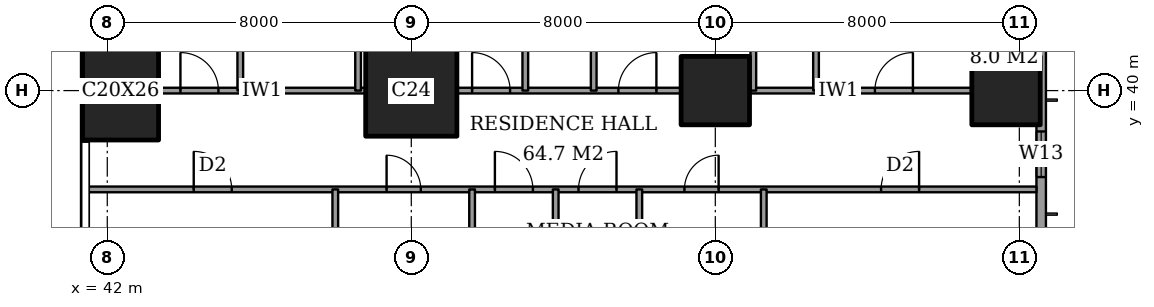
"""IFC4 building model, lengths in metres.
Left out: names, types, materials, properties, quantities, classifications, styles, units other than length and angle.
Written with IfcOpenShell. Run it as: python <this file> out.ifc"""

import sys

from ifc_helpers import new_model, si_unit, direction, frame, frame_2d, origin, origin_2d, place, context, subcontext, project, spatial, rectangle, extrude, element, fill, save


model = new_model("IFC4")
c1 = context("Model", 3, precision=1e-05, world=origin(), true_north=direction((0.0, 1.0)))
c2 = subcontext(c1, "Body", "Model", "MODEL_VIEW")
j1 = project(units=[si_unit("LENGTHUNIT", "METRE"), si_unit("PLANEANGLEUNIT", "RADIAN")], contexts=[c1])
p1 = place(None, origin())
s1 = spatial("IfcSite", under=j1, at=p1, CompositionType="ELEMENT")
p2 = place(p1, origin())
s2 = spatial("IfcBuilding", under=s1, at=p2, CompositionType="ELEMENT")
p3 = place(p2, frame((0.0, 0.0, 218.2)))
s3 = spatial("IfcBuildingStorey", under=s2, at=p3, CompositionType="ELEMENT", Elevation=218.2)
p4 = place(p3, frame((42.35, 40.0, 0.0), z_axis=(0.0, 0.0, 1.0), x_axis=(1.0, 0.0, 0.0)))
e1 = element("IfcColumn", 1, at=p4, inside=s3, PredefinedType="COLUMN", context=c2, shape_type="SweptSolid", body=[
    extrude(rectangle(XDim=2.0, YDim=2.6, at=origin_2d()), origin(), (0.0, 0.0, 1.0), 3.6),
])
p5 = place(p3, frame((50.0, 40.0, 0.0), z_axis=(0.0, 0.0, 1.0), x_axis=(1.0, 0.0, 0.0)))
e2 = element("IfcColumn", 2, at=p5, inside=s3, PredefinedType="COLUMN", context=c2, shape_type="SweptSolid", body=[
    extrude(rectangle(XDim=2.4, YDim=2.4, at=origin_2d()), origin(), (0.0, 0.0, 1.0), 3.6),
])
for number, where, z_axis, x_axis in (
    (3, (58.0, 40.0, 0.0), (0.0, 0.0, 1.0), (1.0, 0.0, 0.0)),
    (4, (65.65, 40.0, 0.0), (0.0, 0.0, 1.0), (1.0, 0.0, 0.0)),
):
    element("IfcColumn", number, at=place(p3, frame(where, z_axis=z_axis, x_axis=x_axis)), inside=s3, PredefinedType="COLUMN", context=c2, shape_type="SweptSolid", body=[
        extrude(rectangle(XDim=1.8, YDim=1.8, at=origin_2d()), origin(), (0.0, 0.0, 1.0), 3.6),
    ])
p6 = place(p3, frame((66.575, 3.175, 0.0), z_axis=(0.0, 0.0, 1.0), x_axis=(0.0, 1.0, 0.0)))
e5 = element("IfcWall", 5, at=p6, inside=s3, PredefinedType="SOLIDWALL", context=c2, shape_type="SweptSolid", body=[
    extrude(rectangle(XDim=41.65, YDim=0.25, at=frame_2d((20.825, 0.0))), origin(), (0.0, 0.0, 1.0), 3.6),
])
p7 = place(p6, frame((0.825, 0.0, 0.2)))
e6 = element("IfcOpeningElement", 6, at=p7, cuts=e5, PredefinedType="OPENING", context=c2, shape_type="SweptSolid", body=[
    extrude(rectangle(XDim=2.4, YDim=2.4, at=frame_2d((1.2, 1.2))), frame((0.0, 0.135, 0.0), z_axis=(0.0, -1.0, 0.0), x_axis=(1.0, 0.0, 0.0)), (0.0, 0.0, 1.0), 0.27),
])
p8 = place(p6, frame((6.225, 0.0, 0.2)))
e7 = element("IfcOpeningElement", 7, at=p8, cuts=e5, PredefinedType="OPENING", context=c2, shape_type="SweptSolid", body=[
    extrude(rectangle(XDim=1.2, YDim=2.4, at=frame_2d((0.6, 1.2))), frame((0.0, 0.135, 0.0), z_axis=(0.0, -1.0, 0.0), x_axis=(1.0, 0.0, 0.0)), (0.0, 0.0, 1.0), 0.27),
])
p9 = place(p6, frame((8.675, 0.0, 0.2)))
e8 = element("IfcOpeningElement", 8, at=p9, cuts=e5, PredefinedType="OPENING", context=c2, shape_type="SweptSolid", body=[
    extrude(rectangle(XDim=2.4, YDim=2.4, at=frame_2d((1.2, 1.2))), frame((0.0, 0.135, 0.0), z_axis=(0.0, -1.0, 0.0), x_axis=(1.0, 0.0, 0.0)), (0.0, 0.0, 1.0), 0.27),
])
p10 = place(p6, frame((15.675, 0.0, 0.2)))
e9 = element("IfcOpeningElement", 9, at=p10, cuts=e5, PredefinedType="OPENING", context=c2, shape_type="SweptSolid", body=[
    extrude(rectangle(XDim=2.4, YDim=2.4, at=frame_2d((1.2, 1.2))), frame((0.0, 0.135, 0.0), z_axis=(0.0, -1.0, 0.0), x_axis=(1.0, 0.0, 0.0)), (0.0, 0.0, 1.0), 0.27),
])
p11 = place(p6, frame((23.575, 0.0, 0.2)))
e10 = element("IfcOpeningElement", 10, at=p11, cuts=e5, PredefinedType="OPENING", context=c2, shape_type="SweptSolid", body=[
    extrude(rectangle(XDim=2.4, YDim=2.4, at=frame_2d((1.2, 1.2))), frame((0.0, 0.135, 0.0), z_axis=(0.0, -1.0, 0.0), x_axis=(1.0, 0.0, 0.0)), (0.0, 0.0, 1.0), 0.27),
])
p12 = place(p6, frame((30.775, 0.0, 0.2)))
e11 = element("IfcOpeningElement", 11, at=p12, cuts=e5, PredefinedType="OPENING", context=c2, shape_type="SweptSolid", body=[
    extrude(rectangle(XDim=2.4, YDim=2.4, at=frame_2d((1.2, 1.2))), frame((0.0, 0.135, 0.0), z_axis=(0.0, -1.0, 0.0), x_axis=(1.0, 0.0, 0.0)), (0.0, 0.0, 1.0), 0.27),
])
p13 = place(p6, frame((34.55, 0.0, 0.2)))
e12 = element("IfcOpeningElement", 12, at=p13, cuts=e5, PredefinedType="OPENING", context=c2, shape_type="SweptSolid", body=[
    extrude(rectangle(XDim=1.2, YDim=2.4, at=frame_2d((0.6, 1.2))), frame((0.0, 0.135, 0.0), z_axis=(0.0, -1.0, 0.0), x_axis=(1.0, 0.0, 0.0)), (0.0, 0.0, 1.0), 0.27),
])
p14 = place(p6, frame((38.425, 0.0, 0.2)))
e13 = element("IfcOpeningElement", 13, at=p14, cuts=e5, PredefinedType="OPENING", context=c2, shape_type="SweptSolid", body=[
    extrude(rectangle(XDim=2.4, YDim=2.4, at=frame_2d((1.2, 1.2))), frame((0.0, 0.135, 0.0), z_axis=(0.0, -1.0, 0.0), x_axis=(1.0, 0.0, 0.0)), (0.0, 0.0, 1.0), 0.27),
])
p15 = place(p3, frame((41.439, 37.4, 0.0), z_axis=(0.0, 0.0, 1.0), x_axis=(1.0, 0.0, 0.0)))
e14 = element("IfcWall", 14, at=p15, inside=s3, PredefinedType="PARTITIONING", context=c2, shape_type="SweptSolid", body=[
    extrude(rectangle(XDim=25.011, YDim=0.15, at=frame_2d((12.505, 0.0))), origin(), (0.0, 0.0, 1.0), 3.35),
])
p16 = place(p15, frame((10.761, 0.0, 0.0)))
e15 = element("IfcOpeningElement", 15, at=p16, cuts=e14, PredefinedType="OPENING", context=c2, shape_type="SweptSolid", body=[
    extrude(rectangle(XDim=1.0, YDim=2.1, at=frame_2d((0.5, 1.05))), frame((0.0, 0.085, 0.0), z_axis=(0.0, -1.0, 0.0), x_axis=(1.0, 0.0, 0.0)), (0.0, 0.0, 1.0), 0.17),
])
p17 = place(p15, frame((20.924, 0.0, 0.0)))
e16 = element("IfcOpeningElement", 16, at=p17, cuts=e14, PredefinedType="OPENING", context=c2, shape_type="SweptSolid", body=[
    extrude(rectangle(XDim=1.0, YDim=2.1, at=frame_2d((0.5, 1.05))), frame((0.0, 0.085, 0.0), z_axis=(0.0, -1.0, 0.0), x_axis=(1.0, 0.0, 0.0)), (0.0, 0.0, 1.0), 0.17),
])
p18 = place(p15, frame((15.749, 0.0, 0.0)))
e17 = element("IfcOpeningElement", 17, at=p18, cuts=e14, PredefinedType="OPENING", context=c2, shape_type="SweptSolid", body=[
    extrude(rectangle(XDim=0.9, YDim=2.1, at=frame_2d((0.45, 1.05))), frame((0.0, 0.085, 0.0), z_axis=(0.0, -1.0, 0.0), x_axis=(1.0, 0.0, 0.0)), (0.0, 0.0, 1.0), 0.17),
])
p19 = place(p15, frame((12.961, 0.0, 0.0)))
e18 = element("IfcOpeningElement", 18, at=p19, cuts=e14, PredefinedType="OPENING", context=c2, shape_type="SweptSolid", body=[
    extrude(rectangle(XDim=1.0, YDim=2.1, at=frame_2d((0.5, 1.05))), frame((0.0, 0.085, 0.0), z_axis=(0.0, -1.0, 0.0), x_axis=(1.0, 0.0, 0.0)), (0.0, 0.0, 1.0), 0.17),
])
p20 = place(p15, frame((7.911, 0.0, 0.0)))
e19 = element("IfcOpeningElement", 19, at=p20, cuts=e14, PredefinedType="OPENING", context=c2, shape_type="SweptSolid", body=[
    extrude(rectangle(XDim=0.9, YDim=2.1, at=frame_2d((0.45, 1.05))), frame((0.0, 0.085, 0.0), z_axis=(0.0, -1.0, 0.0), x_axis=(1.0, 0.0, 0.0)), (0.0, 0.0, 1.0), 0.17),
])
p21 = place(p15, frame((2.836, 0.0, 0.0)))
e20 = element("IfcOpeningElement", 20, at=p21, cuts=e14, PredefinedType="OPENING", context=c2, shape_type="SweptSolid", body=[
    extrude(rectangle(XDim=1.0, YDim=2.1, at=frame_2d((0.5, 1.05))), frame((0.0, 0.085, 0.0), z_axis=(0.0, -1.0, 0.0), x_axis=(1.0, 0.0, 0.0)), (0.0, 0.0, 1.0), 0.17),
])
p22 = place(p3, frame((43.35, 40.0, 0.0), z_axis=(0.0, 0.0, 1.0), x_axis=(1.0, 0.0, 0.0)))
e21 = element("IfcWall", 21, at=p22, inside=s3, PredefinedType="PARTITIONING", context=c2, shape_type="SweptSolid", body=[
    extrude(rectangle(XDim=5.45, YDim=0.15, at=frame_2d((2.725, 0.0))), origin(), (0.0, 0.0, 1.0), 3.35),
])
p23 = place(p22, frame((0.575, 0.0, 0.0)))
e22 = element("IfcOpeningElement", 22, at=p23, cuts=e21, PredefinedType="OPENING", context=c2, shape_type="SweptSolid", body=[
    extrude(rectangle(XDim=1.0, YDim=2.1, at=frame_2d((0.5, 1.05))), frame((0.0, 0.085, 0.0), z_axis=(0.0, -1.0, 0.0), x_axis=(1.0, 0.0, 0.0)), (0.0, 0.0, 1.0), 0.17),
])
p24 = place(p3, frame((51.2, 40.0, 0.0), z_axis=(0.0, 0.0, 1.0), x_axis=(1.0, 0.0, 0.0)))
e23 = element("IfcWall", 23, at=p24, inside=s3, PredefinedType="PARTITIONING", context=c2, shape_type="SweptSolid", body=[
    extrude(rectangle(XDim=5.9, YDim=0.15, at=frame_2d((2.95, 0.0))), origin(), (0.0, 0.0, 1.0), 3.35),
])
p25 = place(p24, frame((4.25, 0.0, 0.0)))
e24 = element("IfcOpeningElement", 24, at=p25, cuts=e23, PredefinedType="OPENING", context=c2, shape_type="SweptSolid", body=[
    extrude(rectangle(XDim=1.0, YDim=2.1, at=frame_2d((0.5, 1.05))), frame((0.0, 0.085, 0.0), z_axis=(0.0, -1.0, 0.0), x_axis=(1.0, 0.0, 0.0)), (0.0, 0.0, 1.0), 0.17),
])
p26 = place(p24, frame((0.4, 0.0, 0.0)))
e25 = element("IfcOpeningElement", 25, at=p26, cuts=e23, PredefinedType="OPENING", context=c2, shape_type="SweptSolid", body=[
    extrude(rectangle(XDim=1.0, YDim=2.1, at=frame_2d((0.5, 1.05))), frame((0.0, 0.085, 0.0), z_axis=(0.0, -1.0, 0.0), x_axis=(1.0, 0.0, 0.0)), (0.0, 0.0, 1.0), 0.17),
])
p27 = place(p3, frame((58.9, 40.0, 0.0), z_axis=(0.0, 0.0, 1.0), x_axis=(1.0, 0.0, 0.0)))
e26 = element("IfcWall", 26, at=p27, inside=s3, PredefinedType="PARTITIONING", context=c2, shape_type="SweptSolid", body=[
    extrude(rectangle(XDim=5.85, YDim=0.15, at=frame_2d((2.925, 0.0))), origin(), (0.0, 0.0, 1.0), 3.35),
])
p28 = place(p27, frame((3.3, 0.0, 0.0)))
e27 = element("IfcOpeningElement", 27, at=p28, cuts=e26, PredefinedType="OPENING", context=c2, shape_type="SweptSolid", body=[
    extrude(rectangle(XDim=1.0, YDim=2.1, at=frame_2d((0.5, 1.05))), frame((0.0, 0.085, 0.0), z_axis=(0.0, -1.0, 0.0), x_axis=(1.0, 0.0, 0.0)), (0.0, 0.0, 1.0), 0.17),
])
p29 = place(p3, frame((45.5, 40.0, 0.0), z_axis=(0.0, 0.0, 1.0), x_axis=(0.0, 1.0, 0.0)))
e28 = element("IfcWall", 28, at=p29, inside=s3, PredefinedType="PARTITIONING", context=c2, shape_type="SweptSolid", body=[
    extrude(rectangle(XDim=8.45, YDim=0.15, at=frame_2d((4.225, 0.0))), origin(), (0.0, 0.0, 1.0), 3.35),
])
p30 = place(p3, frame((48.0, 28.0, 0.0), z_axis=(0.0, 0.0, 1.0), x_axis=(0.0, 1.0, 0.0)))
e29 = element("IfcWall", 29, at=p30, inside=s3, PredefinedType="PARTITIONING", context=c2, shape_type="SweptSolid", body=[
    extrude(rectangle(XDim=9.4, YDim=0.15, at=frame_2d((4.7, 0.0))), origin(), (0.0, 0.0, 1.0), 3.35),
])
p31 = place(p30, frame((0.5, 0.0, 0.0)))
e30 = element("IfcOpeningElement", 30, at=p31, cuts=e29, PredefinedType="OPENING", context=c2, shape_type="SweptSolid", body=[
    extrude(rectangle(XDim=1.0, YDim=2.1, at=frame_2d((0.5, 1.05))), frame((0.0, 0.085, 0.0), z_axis=(0.0, -1.0, 0.0), x_axis=(1.0, 0.0, 0.0)), (0.0, 0.0, 1.0), 0.17),
])
p32 = place(p3, frame((48.6, 40.0, 0.0), z_axis=(0.0, 0.0, 1.0), x_axis=(0.0, 1.0, 0.0)))
e31 = element("IfcWall", 31, at=p32, inside=s3, PredefinedType="PARTITIONING", context=c2, shape_type="SweptSolid", body=[
    extrude(rectangle(XDim=8.45, YDim=0.15, at=frame_2d((4.225, 0.0))), origin(), (0.0, 0.0, 1.0), 3.35),
])
p33 = place(p32, frame((3.775, 0.0, 0.0)))
e32 = element("IfcOpeningElement", 32, at=p33, cuts=e31, PredefinedType="OPENING", context=c2, shape_type="SweptSolid", body=[
    extrude(rectangle(XDim=0.9, YDim=2.1, at=frame_2d((0.45, 1.05))), frame((0.0, 0.085, 0.0), z_axis=(0.0, -1.0, 0.0), x_axis=(1.0, 0.0, 0.0)), (0.0, 0.0, 1.0), 0.17),
])
p34 = place(p3, frame((51.6, 30.0, 0.0), z_axis=(0.0, 0.0, 1.0), x_axis=(0.0, 1.0, 0.0)))
e33 = element("IfcWall", 33, at=p34, inside=s3, PredefinedType="PARTITIONING", context=c2, shape_type="SweptSolid", body=[
    extrude(rectangle(XDim=7.4, YDim=0.15, at=frame_2d((3.7, 0.0))), origin(), (0.0, 0.0, 1.0), 3.35),
])
p35 = place(p3, frame((53.0, 40.0, 0.0), z_axis=(0.0, 0.0, 1.0), x_axis=(0.0, 1.0, 0.0)))
e34 = element("IfcWall", 34, at=p35, inside=s3, PredefinedType="PARTITIONING", context=c2, shape_type="SweptSolid", body=[
    extrude(rectangle(XDim=8.45, YDim=0.15, at=frame_2d((4.225, 0.0))), origin(), (0.0, 0.0, 1.0), 3.35),
])
p36 = place(p3, frame((53.8, 30.0, 0.0), z_axis=(0.0, 0.0, 1.0), x_axis=(0.0, 1.0, 0.0)))
e35 = element("IfcWall", 35, at=p36, inside=s3, PredefinedType="PARTITIONING", context=c2, shape_type="SweptSolid", body=[
    extrude(rectangle(XDim=7.4, YDim=0.15, at=frame_2d((3.7, 0.0))), origin(), (0.0, 0.0, 1.0), 3.35),
])
p37 = place(p3, frame((54.8, 40.0, 0.0), z_axis=(0.0, 0.0, 1.0), x_axis=(0.0, 1.0, 0.0)))
e36 = element("IfcWall", 36, at=p37, inside=s3, PredefinedType="PARTITIONING", context=c2, shape_type="SweptSolid", body=[
    extrude(rectangle(XDim=8.45, YDim=0.15, at=frame_2d((4.225, 0.0))), origin(), (0.0, 0.0, 1.0), 3.35),
])
p38 = place(p37, frame((3.775, 0.0, 0.0)))
e37 = element("IfcOpeningElement", 37, at=p38, cuts=e36, PredefinedType="OPENING", context=c2, shape_type="SweptSolid", body=[
    extrude(rectangle(XDim=0.9, YDim=2.1, at=frame_2d((0.45, 1.05))), frame((0.0, 0.085, 0.0), z_axis=(0.0, -1.0, 0.0), x_axis=(1.0, 0.0, 0.0)), (0.0, 0.0, 1.0), 0.17),
])
p39 = place(p3, frame((56.0, 28.0, 0.0), z_axis=(0.0, 0.0, 1.0), x_axis=(0.0, 1.0, 0.0)))
e38 = element("IfcWall", 38, at=p39, inside=s3, PredefinedType="PARTITIONING", context=c2, shape_type="SweptSolid", body=[
    extrude(rectangle(XDim=9.4, YDim=0.15, at=frame_2d((4.7, 0.0))), origin(), (0.0, 0.0, 1.0), 3.35),
])
p40 = place(p39, frame((0.5, 0.0, 0.0)))
e39 = element("IfcOpeningElement", 39, at=p40, cuts=e38, PredefinedType="OPENING", context=c2, shape_type="SweptSolid", body=[
    extrude(rectangle(XDim=1.0, YDim=2.1, at=frame_2d((0.5, 1.05))), frame((0.0, 0.085, 0.0), z_axis=(0.0, -1.0, 0.0), x_axis=(1.0, 0.0, 0.0)), (0.0, 0.0, 1.0), 0.17),
])
p41 = place(p3, frame((59.0, 40.0, 0.0), z_axis=(0.0, 0.0, 1.0), x_axis=(0.0, 1.0, 0.0)))
e40 = element("IfcWall", 40, at=p41, inside=s3, PredefinedType="PARTITIONING", context=c2, shape_type="SweptSolid", body=[
    extrude(rectangle(XDim=8.45, YDim=0.15, at=frame_2d((4.225, 0.0))), origin(), (0.0, 0.0, 1.0), 3.35),
])
p42 = place(p3, frame((59.275, 33.2, 0.0), z_axis=(0.0, 0.0, 1.0), x_axis=(0.0, 1.0, 0.0)))
e41 = element("IfcWall", 41, at=p42, inside=s3, PredefinedType="PARTITIONING", context=c2, shape_type="SweptSolid", body=[
    extrude(rectangle(XDim=4.2, YDim=0.15, at=frame_2d((2.1, 0.0))), origin(), (0.0, 0.0, 1.0), 3.35),
])
p43 = place(p3, frame((60.65, 40.0, 0.0), z_axis=(0.0, 0.0, 1.0), x_axis=(0.0, 1.0, 0.0)))
e42 = element("IfcWall", 42, at=p43, inside=s3, PredefinedType="PARTITIONING", context=c2, shape_type="SweptSolid", body=[
    extrude(rectangle(XDim=8.45, YDim=0.15, at=frame_2d((4.225, 0.0))), origin(), (0.0, 0.0, 1.0), 3.35),
])
p44 = place(p43, frame((3.775, 0.0, 0.0)))
e43 = element("IfcOpeningElement", 43, at=p44, cuts=e42, PredefinedType="OPENING", context=c2, shape_type="SweptSolid", body=[
    extrude(rectangle(XDim=0.9, YDim=2.1, at=frame_2d((0.45, 1.05))), frame((0.0, 0.085, 0.0), z_axis=(0.0, -1.0, 0.0), x_axis=(1.0, 0.0, 0.0)), (0.0, 0.0, 1.0), 0.17),
])
p45 = place(p3, frame((64.75, 40.9, 0.0), z_axis=(0.0, 0.0, 1.0), x_axis=(0.0, 1.0, 0.0)))
e44 = element("IfcWall", 44, at=p45, inside=s3, PredefinedType="PARTITIONING", context=c2, shape_type="SweptSolid", body=[
    extrude(rectangle(XDim=3.8, YDim=0.15, at=frame_2d((1.9, 0.0))), origin(), (0.0, 0.0, 1.0), 3.35),
])
p46 = place(p45, frame((1.45, 0.0, 0.0)))
e45 = element("IfcOpeningElement", 45, at=p46, cuts=e44, PredefinedType="OPENING", context=c2, shape_type="SweptSolid", body=[
    extrude(rectangle(XDim=0.9, YDim=2.1, at=frame_2d((0.45, 1.05))), frame((0.0, 0.085, 0.0), z_axis=(0.0, -1.0, 0.0), x_axis=(1.0, 0.0, 0.0)), (0.0, 0.0, 1.0), 0.17),
])
p47 = place(p13, origin())
e46 = element("IfcWindow", 46, at=p47, inside=s3, PartitioningType="SINGLE_PANEL", PredefinedType="WINDOW", context=c2, shape_type="SweptSolid", body=[
    extrude(rectangle(XDim=1.2, YDim=2.4, at=frame_2d((0.6, 1.2))), frame((0.0, 0.03, 0.0), z_axis=(0.0, -1.0, 0.0), x_axis=(1.0, 0.0, 0.0)), (0.0, 0.0, 1.0), 0.06),
])
fill(e12, e46)
p48 = place(p28, origin())
e47 = element("IfcDoor", 47, at=p48, inside=s3, OperationType="SINGLE_SWING_LEFT", PredefinedType="DOOR", context=c2, shape_type="SweptSolid", body=[
    extrude(rectangle(XDim=1.0, YDim=2.1, at=frame_2d((0.5, 1.05))), frame((0.0, 0.025, 0.0), z_axis=(0.0, -1.0, 0.0), x_axis=(1.0, 0.0, 0.0)), (0.0, 0.0, 1.0), 0.05),
])
fill(e27, e47)
p49 = place(p25, origin())
e48 = element("IfcDoor", 48, at=p49, inside=s3, OperationType="SINGLE_SWING_LEFT", PredefinedType="DOOR", context=c2, shape_type="SweptSolid", body=[
    extrude(rectangle(XDim=1.0, YDim=2.1, at=frame_2d((0.5, 1.05))), frame((0.0, 0.025, 0.0), z_axis=(0.0, -1.0, 0.0), x_axis=(1.0, 0.0, 0.0)), (0.0, 0.0, 1.0), 0.05),
])
fill(e24, e48)
p50 = place(p26, origin())
e49 = element("IfcDoor", 49, at=p50, inside=s3, OperationType="SINGLE_SWING_RIGHT", PredefinedType="DOOR", context=c2, shape_type="SweptSolid", body=[
    extrude(rectangle(XDim=1.0, YDim=2.1, at=frame_2d((0.5, 1.05))), frame((0.0, 0.025, 0.0), z_axis=(0.0, -1.0, 0.0), x_axis=(1.0, 0.0, 0.0)), (0.0, 0.0, 1.0), 0.05),
])
fill(e25, e49)
p51 = place(p23, origin())
e50 = element("IfcDoor", 50, at=p51, inside=s3, OperationType="SINGLE_SWING_RIGHT", PredefinedType="DOOR", context=c2, shape_type="SweptSolid", body=[
    extrude(rectangle(XDim=1.0, YDim=2.1, at=frame_2d((0.5, 1.05))), frame((0.0, 0.025, 0.0), z_axis=(0.0, -1.0, 0.0), x_axis=(1.0, 0.0, 0.0)), (0.0, 0.0, 1.0), 0.05),
])
fill(e22, e50)
p52 = place(p16, origin())
e51 = element("IfcDoor", 51, at=p52, inside=s3, OperationType="SINGLE_SWING_RIGHT", PredefinedType="DOOR", context=c2, shape_type="SweptSolid", body=[
    extrude(rectangle(XDim=1.0, YDim=2.1, at=frame_2d((0.5, 1.05))), frame((0.0, 0.025, 0.0), z_axis=(0.0, -1.0, 0.0), x_axis=(1.0, 0.0, 0.0)), (0.0, 0.0, 1.0), 0.05),
])
fill(e15, e51)
p53 = place(p17, origin())
e52 = element("IfcDoor", 52, at=p53, inside=s3, OperationType="SINGLE_SWING_LEFT", PredefinedType="DOOR", context=c2, shape_type="SweptSolid", body=[
    extrude(rectangle(XDim=1.0, YDim=2.1, at=frame_2d((0.5, 1.05))), frame((0.0, 0.025, 0.0), z_axis=(0.0, -1.0, 0.0), x_axis=(1.0, 0.0, 0.0)), (0.0, 0.0, 1.0), 0.05),
])
fill(e16, e52)
p54 = place(p18, origin())
e53 = element("IfcDoor", 53, at=p54, inside=s3, OperationType="SINGLE_SWING_LEFT", PredefinedType="DOOR", context=c2, shape_type="SweptSolid", body=[
    extrude(rectangle(XDim=0.9, YDim=2.1, at=frame_2d((0.45, 1.05))), frame((0.0, 0.025, 0.0), z_axis=(0.0, -1.0, 0.0), x_axis=(1.0, 0.0, 0.0)), (0.0, 0.0, 1.0), 0.05),
])
fill(e17, e53)
p55 = place(p19, origin())
e54 = element("IfcDoor", 54, at=p55, inside=s3, OperationType="SINGLE_SWING_LEFT", PredefinedType="DOOR", context=c2, shape_type="SweptSolid", body=[
    extrude(rectangle(XDim=1.0, YDim=2.1, at=frame_2d((0.5, 1.05))), frame((0.0, 0.025, 0.0), z_axis=(0.0, -1.0, 0.0), x_axis=(1.0, 0.0, 0.0)), (0.0, 0.0, 1.0), 0.05),
])
fill(e18, e54)
p56 = place(p20, origin())
e55 = element("IfcDoor", 55, at=p56, inside=s3, OperationType="SINGLE_SWING_RIGHT", PredefinedType="DOOR", context=c2, shape_type="SweptSolid", body=[
    extrude(rectangle(XDim=0.9, YDim=2.1, at=frame_2d((0.45, 1.05))), frame((0.0, 0.025, 0.0), z_axis=(0.0, -1.0, 0.0), x_axis=(1.0, 0.0, 0.0)), (0.0, 0.0, 1.0), 0.05),
])
fill(e19, e55)
p57 = place(p21, origin())
e56 = element("IfcDoor", 56, at=p57, inside=s3, OperationType="SINGLE_SWING_RIGHT", PredefinedType="DOOR", context=c2, shape_type="SweptSolid", body=[
    extrude(rectangle(XDim=1.0, YDim=2.1, at=frame_2d((0.5, 1.05))), frame((0.0, 0.025, 0.0), z_axis=(0.0, -1.0, 0.0), x_axis=(1.0, 0.0, 0.0)), (0.0, 0.0, 1.0), 0.05),
])
fill(e20, e56)
save(model, sys.argv[1])
